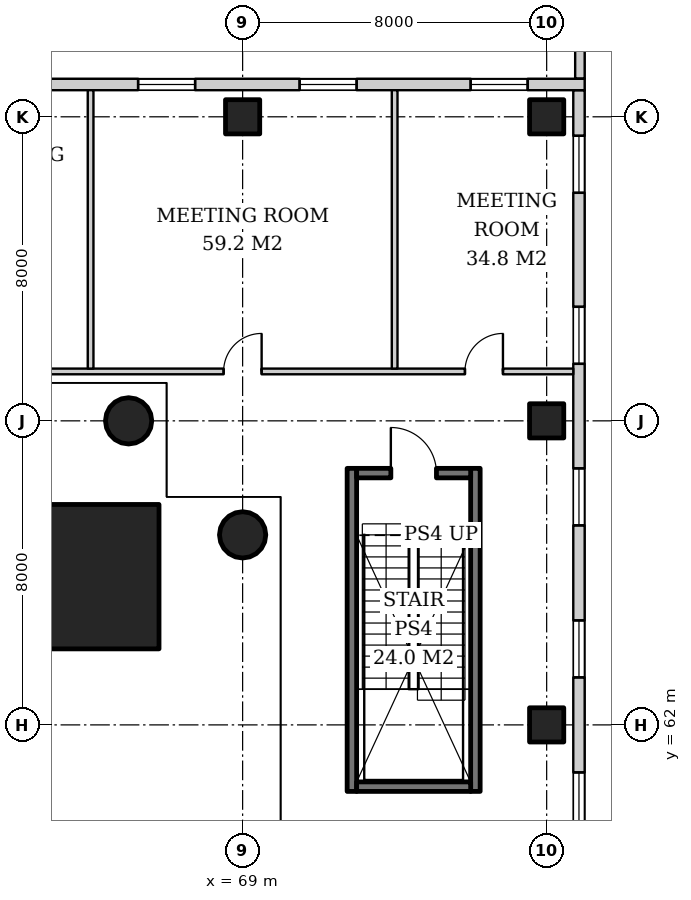
"""IFC4 building model, lengths in metres.
Left out: names, types, materials, properties, quantities, classifications, styles, units other than length and angle.
Written with IfcOpenShell. Run it as: python <this file> out.ifc"""

import sys

from ifc_helpers import new_model, si_unit, direction, frame, frame_2d, origin, origin_2d, place, context, subcontext, project, spatial, rectangle, hollow_circle, extrude, element, fill, save


model = new_model("IFC4")
c1 = context("Model", 3, precision=1e-05, world=origin(), true_north=direction((0.0, 1.0)))
c2 = subcontext(c1, "Body", "Model", "MODEL_VIEW")
j1 = project(units=[si_unit("LENGTHUNIT", "METRE"), si_unit("PLANEANGLEUNIT", "RADIAN")], contexts=[c1])
p1 = place(None, origin())
s1 = spatial("IfcSite", under=j1, at=p1, CompositionType="ELEMENT")
p2 = place(p1, origin())
s2 = spatial("IfcBuilding", under=s1, at=p2, CompositionType="ELEMENT")
p3 = place(p2, frame((0.0, 0.0, 11.0)))
s3 = spatial("IfcBuildingStorey", under=s2, at=p3, CompositionType="ELEMENT", Elevation=11.0)
for number, where, z_axis, x_axis in (
    (1, (69.0, 78.0, 0.0), (0.0, 0.0, 1.0), (1.0, 0.0, 0.0)),
    (2, (77.0, 62.0, 0.0), (0.0, 0.0, 1.0), (1.0, 0.0, 0.0)),
    (3, (77.0, 70.0, 0.0), (0.0, 0.0, 1.0), (1.0, 0.0, 0.0)),
    (4, (77.0, 78.0, 0.0), (0.0, 0.0, 1.0), (1.0, 0.0, 0.0)),
):
    element("IfcColumn", number, at=place(p3, frame(where, z_axis=z_axis, x_axis=x_axis)), inside=s3, PredefinedType="COLUMN", context=c2, shape_type="SweptSolid", body=[
        extrude(rectangle(XDim=0.9, YDim=0.9, at=origin_2d()), origin(), (0.0, 0.0, 1.0), 5.0),
    ])
p4 = place(p3, frame((64.9, 65.9, 0.0), z_axis=(0.0, 0.0, 1.0), x_axis=(1.0, 0.0, 0.0)))
e5 = element("IfcColumn", 5, at=p4, inside=s3, PredefinedType="COLUMN", context=c2, shape_type="SweptSolid", body=[
    extrude(rectangle(XDim=3.8, YDim=3.8, at=origin_2d()), origin(), (0.0, 0.0, 1.0), 5.0),
])
for number, where, z_axis, x_axis in (
    (6, (69.0, 67.0, 0.0), (0.0, 0.0, 1.0), (1.0, 0.0, 0.0)),
    (7, (66.0, 70.0, 0.0), (0.0, 0.0, 1.0), (1.0, 0.0, 0.0)),
):
    element("IfcColumn", number, at=place(p3, frame(where, z_axis=z_axis, x_axis=x_axis)), inside=s3, PredefinedType="COLUMN", context=c2, shape_type="SweptSolid", body=[
        extrude(hollow_circle(Radius=0.61, WallThickness=0.04, at=origin_2d()), origin(), (0.0, 0.0, 1.0), 5.0),
    ])
p5 = place(p3, frame((77.85, 21.3, 0.0), z_axis=(0.0, 0.0, 1.0), x_axis=(0.0, 1.0, 0.0)))
e8 = element("IfcWall", 8, at=p5, inside=s3, PredefinedType="SOLIDWALL", context=c2, shape_type="SweptSolid", body=[
    extrude(rectangle(XDim=57.4, YDim=0.3, at=frame_2d((28.7, 0.0))), origin(), (0.0, 0.0, 1.0), 4.7),
])
p6 = place(p5, frame((1.2, 0.0, 0.9)))
e9 = element("IfcOpeningElement", 9, at=p6, cuts=e8, PredefinedType="OPENING", context=c2, shape_type="SweptSolid", body=[
    extrude(rectangle(XDim=1.5, YDim=3.2, at=frame_2d((0.75, 1.6))), frame((0.0, 0.16, 0.0), z_axis=(0.0, -1.0, 0.0), x_axis=(1.0, 0.0, 0.0)), (0.0, 0.0, 1.0), 0.32),
])
p7 = place(p5, frame((5.7, 0.0, 0.9)))
e10 = element("IfcOpeningElement", 10, at=p7, cuts=e8, PredefinedType="OPENING", context=c2, shape_type="SweptSolid", body=[
    extrude(rectangle(XDim=1.5, YDim=3.2, at=frame_2d((0.75, 1.6))), frame((0.0, 0.16, 0.0), z_axis=(0.0, -1.0, 0.0), x_axis=(1.0, 0.0, 0.0)), (0.0, 0.0, 1.0), 0.32),
])
p8 = place(p5, frame((9.95, 0.0, 0.9)))
e11 = element("IfcOpeningElement", 11, at=p8, cuts=e8, PredefinedType="OPENING", context=c2, shape_type="SweptSolid", body=[
    extrude(rectangle(XDim=1.5, YDim=3.2, at=frame_2d((0.75, 1.6))), frame((0.0, 0.16, 0.0), z_axis=(0.0, -1.0, 0.0), x_axis=(1.0, 0.0, 0.0)), (0.0, 0.0, 1.0), 0.32),
])
p9 = place(p5, frame((13.95, 0.0, 0.9)))
e12 = element("IfcOpeningElement", 12, at=p9, cuts=e8, PredefinedType="OPENING", context=c2, shape_type="SweptSolid", body=[
    extrude(rectangle(XDim=1.5, YDim=3.2, at=frame_2d((0.75, 1.6))), frame((0.0, 0.16, 0.0), z_axis=(0.0, -1.0, 0.0), x_axis=(1.0, 0.0, 0.0)), (0.0, 0.0, 1.0), 0.32),
])
p10 = place(p5, frame((25.95, 0.0, 0.9)))
e13 = element("IfcOpeningElement", 13, at=p10, cuts=e8, PredefinedType="OPENING", context=c2, shape_type="SweptSolid", body=[
    extrude(rectangle(XDim=1.5, YDim=3.2, at=frame_2d((0.75, 1.6))), frame((0.0, 0.16, 0.0), z_axis=(0.0, -1.0, 0.0), x_axis=(1.0, 0.0, 0.0)), (0.0, 0.0, 1.0), 0.32),
])
p11 = place(p5, frame((29.95, 0.0, 0.9)))
e14 = element("IfcOpeningElement", 14, at=p11, cuts=e8, PredefinedType="OPENING", context=c2, shape_type="SweptSolid", body=[
    extrude(rectangle(XDim=1.5, YDim=3.2, at=frame_2d((0.75, 1.6))), frame((0.0, 0.16, 0.0), z_axis=(0.0, -1.0, 0.0), x_axis=(1.0, 0.0, 0.0)), (0.0, 0.0, 1.0), 0.32),
])
p12 = place(p5, frame((33.95, 0.0, 0.9)))
e15 = element("IfcOpeningElement", 15, at=p12, cuts=e8, PredefinedType="OPENING", context=c2, shape_type="SweptSolid", body=[
    extrude(rectangle(XDim=1.5, YDim=3.2, at=frame_2d((0.75, 1.6))), frame((0.0, 0.16, 0.0), z_axis=(0.0, -1.0, 0.0), x_axis=(1.0, 0.0, 0.0)), (0.0, 0.0, 1.0), 0.32),
])
p13 = place(p5, frame((37.95, 0.0, 0.9)))
e16 = element("IfcOpeningElement", 16, at=p13, cuts=e8, PredefinedType="OPENING", context=c2, shape_type="SweptSolid", body=[
    extrude(rectangle(XDim=1.5, YDim=3.2, at=frame_2d((0.75, 1.6))), frame((0.0, 0.16, 0.0), z_axis=(0.0, -1.0, 0.0), x_axis=(1.0, 0.0, 0.0)), (0.0, 0.0, 1.0), 0.32),
])
p14 = place(p5, frame((41.95, 0.0, 0.9)))
e17 = element("IfcOpeningElement", 17, at=p14, cuts=e8, PredefinedType="OPENING", context=c2, shape_type="SweptSolid", body=[
    extrude(rectangle(XDim=1.5, YDim=3.2, at=frame_2d((0.75, 1.6))), frame((0.0, 0.16, 0.0), z_axis=(0.0, -1.0, 0.0), x_axis=(1.0, 0.0, 0.0)), (0.0, 0.0, 1.0), 0.32),
])
p15 = place(p5, frame((45.95, 0.0, 0.9)))
e18 = element("IfcOpeningElement", 18, at=p15, cuts=e8, PredefinedType="OPENING", context=c2, shape_type="SweptSolid", body=[
    extrude(rectangle(XDim=1.5, YDim=3.2, at=frame_2d((0.75, 1.6))), frame((0.0, 0.16, 0.0), z_axis=(0.0, -1.0, 0.0), x_axis=(1.0, 0.0, 0.0)), (0.0, 0.0, 1.0), 0.32),
])
p16 = place(p5, frame((50.2, 0.0, 0.9)))
e19 = element("IfcOpeningElement", 19, at=p16, cuts=e8, PredefinedType="OPENING", context=c2, shape_type="SweptSolid", body=[
    extrude(rectangle(XDim=1.5, YDim=3.2, at=frame_2d((0.75, 1.6))), frame((0.0, 0.16, 0.0), z_axis=(0.0, -1.0, 0.0), x_axis=(1.0, 0.0, 0.0)), (0.0, 0.0, 1.0), 0.32),
])
p17 = place(p5, frame((54.7, 0.0, 0.9)))
e20 = element("IfcOpeningElement", 20, at=p17, cuts=e8, PredefinedType="OPENING", context=c2, shape_type="SweptSolid", body=[
    extrude(rectangle(XDim=1.5, YDim=3.2, at=frame_2d((0.75, 1.6))), frame((0.0, 0.16, 0.0), z_axis=(0.0, -1.0, 0.0), x_axis=(1.0, 0.0, 0.0)), (0.0, 0.0, 1.0), 0.32),
])
p18 = place(p5, frame((22.115, 0.0, 0.0)))
e21 = element("IfcOpeningElement", 21, at=p18, cuts=e8, PredefinedType="OPENING", context=c2, shape_type="SweptSolid", body=[
    extrude(rectangle(XDim=2.0, YDim=2.4, at=frame_2d((1.0, 1.2))), frame((0.0, 0.16, 0.0), z_axis=(0.0, -1.0, 0.0), x_axis=(1.0, 0.0, 0.0)), (0.0, 0.0, 1.0), 0.32),
])
p19 = place(p3, frame((78.0, 78.85, 0.0), z_axis=(0.0, 0.0, 1.0), x_axis=(-1.0, 0.0, 0.0)))
e22 = element("IfcWall", 22, at=p19, inside=s3, PredefinedType="SOLIDWALL", context=c2, shape_type="SweptSolid", body=[
    extrude(rectangle(XDim=58.0, YDim=0.3, at=frame_2d((29.0, 0.0))), origin(), (0.0, 0.0, 1.0), 4.7),
])
p20 = place(p19, frame((1.5, 0.0, 0.9)))
e23 = element("IfcOpeningElement", 23, at=p20, cuts=e22, PredefinedType="OPENING", context=c2, shape_type="SweptSolid", body=[
    extrude(rectangle(XDim=1.5, YDim=3.2, at=frame_2d((0.75, 1.6))), frame((0.0, 0.16, 0.0), z_axis=(0.0, -1.0, 0.0), x_axis=(1.0, 0.0, 0.0)), (0.0, 0.0, 1.0), 0.32),
])
p21 = place(p19, frame((6.0, 0.0, 0.9)))
e24 = element("IfcOpeningElement", 24, at=p21, cuts=e22, PredefinedType="OPENING", context=c2, shape_type="SweptSolid", body=[
    extrude(rectangle(XDim=1.5, YDim=3.2, at=frame_2d((0.75, 1.6))), frame((0.0, 0.16, 0.0), z_axis=(0.0, -1.0, 0.0), x_axis=(1.0, 0.0, 0.0)), (0.0, 0.0, 1.0), 0.32),
])
p22 = place(p19, frame((10.25, 0.0, 0.9)))
e25 = element("IfcOpeningElement", 25, at=p22, cuts=e22, PredefinedType="OPENING", context=c2, shape_type="SweptSolid", body=[
    extrude(rectangle(XDim=1.5, YDim=3.2, at=frame_2d((0.75, 1.6))), frame((0.0, 0.16, 0.0), z_axis=(0.0, -1.0, 0.0), x_axis=(1.0, 0.0, 0.0)), (0.0, 0.0, 1.0), 0.32),
])
p23 = place(p19, frame((14.25, 0.0, 0.9)))
e26 = element("IfcOpeningElement", 26, at=p23, cuts=e22, PredefinedType="OPENING", context=c2, shape_type="SweptSolid", body=[
    extrude(rectangle(XDim=1.5, YDim=3.2, at=frame_2d((0.75, 1.6))), frame((0.0, 0.16, 0.0), z_axis=(0.0, -1.0, 0.0), x_axis=(1.0, 0.0, 0.0)), (0.0, 0.0, 1.0), 0.32),
])
p24 = place(p19, frame((18.25, 0.0, 0.9)))
e27 = element("IfcOpeningElement", 27, at=p24, cuts=e22, PredefinedType="OPENING", context=c2, shape_type="SweptSolid", body=[
    extrude(rectangle(XDim=1.5, YDim=3.2, at=frame_2d((0.75, 1.6))), frame((0.0, 0.16, 0.0), z_axis=(0.0, -1.0, 0.0), x_axis=(1.0, 0.0, 0.0)), (0.0, 0.0, 1.0), 0.32),
])
p25 = place(p19, frame((22.25, 0.0, 0.9)))
e28 = element("IfcOpeningElement", 28, at=p25, cuts=e22, PredefinedType="OPENING", context=c2, shape_type="SweptSolid", body=[
    extrude(rectangle(XDim=1.5, YDim=3.2, at=frame_2d((0.75, 1.6))), frame((0.0, 0.16, 0.0), z_axis=(0.0, -1.0, 0.0), x_axis=(1.0, 0.0, 0.0)), (0.0, 0.0, 1.0), 0.32),
])
p26 = place(p19, frame((26.1, 0.0, 0.0)))
e29 = element("IfcOpeningElement", 29, at=p26, cuts=e22, PredefinedType="OPENING", context=c2, shape_type="SweptSolid", body=[
    extrude(rectangle(XDim=1.8, YDim=2.4, at=frame_2d((0.9, 1.2))), frame((0.0, 0.16, 0.0), z_axis=(0.0, -1.0, 0.0), x_axis=(1.0, 0.0, 0.0)), (0.0, 0.0, 1.0), 0.32),
])
p27 = place(p19, frame((30.25, 0.0, 0.9)))
e30 = element("IfcOpeningElement", 30, at=p27, cuts=e22, PredefinedType="OPENING", context=c2, shape_type="SweptSolid", body=[
    extrude(rectangle(XDim=1.5, YDim=3.2, at=frame_2d((0.75, 1.6))), frame((0.0, 0.16, 0.0), z_axis=(0.0, -1.0, 0.0), x_axis=(1.0, 0.0, 0.0)), (0.0, 0.0, 1.0), 0.32),
])
p28 = place(p19, frame((34.25, 0.0, 0.9)))
e31 = element("IfcOpeningElement", 31, at=p28, cuts=e22, PredefinedType="OPENING", context=c2, shape_type="SweptSolid", body=[
    extrude(rectangle(XDim=1.5, YDim=3.2, at=frame_2d((0.75, 1.6))), frame((0.0, 0.16, 0.0), z_axis=(0.0, -1.0, 0.0), x_axis=(1.0, 0.0, 0.0)), (0.0, 0.0, 1.0), 0.32),
])
p29 = place(p19, frame((38.25, 0.0, 0.9)))
e32 = element("IfcOpeningElement", 32, at=p29, cuts=e22, PredefinedType="OPENING", context=c2, shape_type="SweptSolid", body=[
    extrude(rectangle(XDim=1.5, YDim=3.2, at=frame_2d((0.75, 1.6))), frame((0.0, 0.16, 0.0), z_axis=(0.0, -1.0, 0.0), x_axis=(1.0, 0.0, 0.0)), (0.0, 0.0, 1.0), 0.32),
])
p30 = place(p19, frame((42.25, 0.0, 0.9)))
e33 = element("IfcOpeningElement", 33, at=p30, cuts=e22, PredefinedType="OPENING", context=c2, shape_type="SweptSolid", body=[
    extrude(rectangle(XDim=1.5, YDim=3.2, at=frame_2d((0.75, 1.6))), frame((0.0, 0.16, 0.0), z_axis=(0.0, -1.0, 0.0), x_axis=(1.0, 0.0, 0.0)), (0.0, 0.0, 1.0), 0.32),
])
p31 = place(p19, frame((46.25, 0.0, 0.9)))
e34 = element("IfcOpeningElement", 34, at=p31, cuts=e22, PredefinedType="OPENING", context=c2, shape_type="SweptSolid", body=[
    extrude(rectangle(XDim=1.5, YDim=3.2, at=frame_2d((0.75, 1.6))), frame((0.0, 0.16, 0.0), z_axis=(0.0, -1.0, 0.0), x_axis=(1.0, 0.0, 0.0)), (0.0, 0.0, 1.0), 0.32),
])
p32 = place(p19, frame((50.5, 0.0, 0.9)))
e35 = element("IfcOpeningElement", 35, at=p32, cuts=e22, PredefinedType="OPENING", context=c2, shape_type="SweptSolid", body=[
    extrude(rectangle(XDim=1.5, YDim=3.2, at=frame_2d((0.75, 1.6))), frame((0.0, 0.16, 0.0), z_axis=(0.0, -1.0, 0.0), x_axis=(1.0, 0.0, 0.0)), (0.0, 0.0, 1.0), 0.32),
])
p33 = place(p19, frame((55.0, 0.0, 0.9)))
e36 = element("IfcOpeningElement", 36, at=p33, cuts=e22, PredefinedType="OPENING", context=c2, shape_type="SweptSolid", body=[
    extrude(rectangle(XDim=1.5, YDim=3.2, at=frame_2d((0.75, 1.6))), frame((0.0, 0.16, 0.0), z_axis=(0.0, -1.0, 0.0), x_axis=(1.0, 0.0, 0.0)), (0.0, 0.0, 1.0), 0.32),
])
p34 = place(p3, frame((77.875, 79.01, 0.0), z_axis=(0.0, 0.0, 1.0), x_axis=(0.0, 1.0, 0.0)))
e37 = element("IfcWall", 37, at=p34, inside=s3, PredefinedType="PARAPET", context=c2, shape_type="SweptSolid", body=[
    extrude(rectangle(XDim=7.74, YDim=0.25, at=frame_2d((3.87, 0.0))), origin(), (0.0, 0.0, 1.0), 1.1),
])
for number, where, z_axis, x_axis in (
    (38, (71.875, 60.25, 0.0), (0.0, 0.0, 1.0), (0.0, 1.0, 0.0)),
    (39, (75.125, 60.25, 0.0), (0.0, 0.0, 1.0), (0.0, 1.0, 0.0)),
):
    element("IfcWall", number, at=place(p3, frame(where, z_axis=z_axis, x_axis=x_axis)), inside=s3, PredefinedType="SOLIDWALL", context=c2, shape_type="SweptSolid", body=[
        extrude(rectangle(XDim=8.5, YDim=0.25, at=frame_2d((4.25, 0.0))), origin(), (0.0, 0.0, 1.0), 4.7),
    ])
p35 = place(p3, frame((72.0, 60.375, 0.0), z_axis=(0.0, 0.0, 1.0), x_axis=(1.0, 0.0, 0.0)))
e40 = element("IfcWall", 40, at=p35, inside=s3, PredefinedType="SOLIDWALL", context=c2, shape_type="SweptSolid", body=[
    extrude(rectangle(XDim=3.0, YDim=0.25, at=frame_2d((1.5, 0.0))), origin(), (0.0, 0.0, 1.0), 4.7),
])
p36 = place(p3, frame((72.0, 68.625, 0.0), z_axis=(0.0, 0.0, 1.0), x_axis=(1.0, 0.0, 0.0)))
e41 = element("IfcWall", 41, at=p36, inside=s3, PredefinedType="SOLIDWALL", context=c2, shape_type="SweptSolid", body=[
    extrude(rectangle(XDim=3.0, YDim=0.25, at=frame_2d((1.5, 0.0))), origin(), (0.0, 0.0, 1.0), 4.7),
])
p37 = place(p36, frame((0.9, 0.0, 0.0)))
e42 = element("IfcOpeningElement", 42, at=p37, cuts=e41, PredefinedType="OPENING", context=c2, shape_type="SweptSolid", body=[
    extrude(rectangle(XDim=1.2, YDim=2.1, at=frame_2d((0.6, 1.05))), frame((0.0, 0.135, 0.0), z_axis=(0.0, -1.0, 0.0), x_axis=(1.0, 0.0, 0.0)), (0.0, 0.0, 1.0), 0.27),
])
p38 = place(p3, frame((20.3, 71.3, 0.0), z_axis=(0.0, 0.0, 1.0), x_axis=(1.0, 0.0, 0.0)))
e43 = element("IfcWall", 43, at=p38, inside=s3, PredefinedType="PARTITIONING", context=c2, shape_type="SweptSolid", body=[
    extrude(rectangle(XDim=57.4, YDim=0.15, at=frame_2d((28.7, 0.0))), origin(), (0.0, 0.0, 1.0), 3.2),
])
p39 = place(p38, frame((1.85, 0.0, 0.0)))
e44 = element("IfcOpeningElement", 44, at=p39, cuts=e43, PredefinedType="OPENING", context=c2, shape_type="SweptSolid", body=[
    extrude(rectangle(XDim=1.0, YDim=2.1, at=frame_2d((0.5, 1.05))), frame((0.0, 0.085, 0.0), z_axis=(0.0, -1.0, 0.0), x_axis=(1.0, 0.0, 0.0)), (0.0, 0.0, 1.0), 0.17),
])
p40 = place(p38, frame((6.2, 0.0, 0.0)))
e45 = element("IfcOpeningElement", 45, at=p40, cuts=e43, PredefinedType="OPENING", context=c2, shape_type="SweptSolid", body=[
    extrude(rectangle(XDim=1.0, YDim=2.1, at=frame_2d((0.5, 1.05))), frame((0.0, 0.085, 0.0), z_axis=(0.0, -1.0, 0.0), x_axis=(1.0, 0.0, 0.0)), (0.0, 0.0, 1.0), 0.17),
])
p41 = place(p38, frame((10.2, 0.0, 0.0)))
e46 = element("IfcOpeningElement", 46, at=p41, cuts=e43, PredefinedType="OPENING", context=c2, shape_type="SweptSolid", body=[
    extrude(rectangle(XDim=1.0, YDim=2.1, at=frame_2d((0.5, 1.05))), frame((0.0, 0.085, 0.0), z_axis=(0.0, -1.0, 0.0), x_axis=(1.0, 0.0, 0.0)), (0.0, 0.0, 1.0), 0.17),
])
p42 = place(p38, frame((16.2, 0.0, 0.0)))
e47 = element("IfcOpeningElement", 47, at=p42, cuts=e43, PredefinedType="OPENING", context=c2, shape_type="SweptSolid", body=[
    extrude(rectangle(XDim=1.0, YDim=2.1, at=frame_2d((0.5, 1.05))), frame((0.0, 0.085, 0.0), z_axis=(0.0, -1.0, 0.0), x_axis=(1.0, 0.0, 0.0)), (0.0, 0.0, 1.0), 0.17),
])
p43 = place(p38, frame((22.2, 0.0, 0.0)))
e48 = element("IfcOpeningElement", 48, at=p43, cuts=e43, PredefinedType="OPENING", context=c2, shape_type="SweptSolid", body=[
    extrude(rectangle(XDim=1.0, YDim=2.1, at=frame_2d((0.5, 1.05))), frame((0.0, 0.085, 0.0), z_axis=(0.0, -1.0, 0.0), x_axis=(1.0, 0.0, 0.0)), (0.0, 0.0, 1.0), 0.17),
])
p44 = place(p38, frame((26.2, 0.0, 0.0)))
e49 = element("IfcOpeningElement", 49, at=p44, cuts=e43, PredefinedType="OPENING", context=c2, shape_type="SweptSolid", body=[
    extrude(rectangle(XDim=1.0, YDim=2.1, at=frame_2d((0.5, 1.05))), frame((0.0, 0.085, 0.0), z_axis=(0.0, -1.0, 0.0), x_axis=(1.0, 0.0, 0.0)), (0.0, 0.0, 1.0), 0.17),
])
p45 = place(p38, frame((32.2, 0.0, 0.0)))
e50 = element("IfcOpeningElement", 50, at=p45, cuts=e43, PredefinedType="OPENING", context=c2, shape_type="SweptSolid", body=[
    extrude(rectangle(XDim=1.0, YDim=2.1, at=frame_2d((0.5, 1.05))), frame((0.0, 0.085, 0.0), z_axis=(0.0, -1.0, 0.0), x_axis=(1.0, 0.0, 0.0)), (0.0, 0.0, 1.0), 0.17),
])
p46 = place(p38, frame((38.2, 0.0, 0.0)))
e51 = element("IfcOpeningElement", 51, at=p46, cuts=e43, PredefinedType="OPENING", context=c2, shape_type="SweptSolid", body=[
    extrude(rectangle(XDim=1.0, YDim=2.1, at=frame_2d((0.5, 1.05))), frame((0.0, 0.085, 0.0), z_axis=(0.0, -1.0, 0.0), x_axis=(1.0, 0.0, 0.0)), (0.0, 0.0, 1.0), 0.17),
])
p47 = place(p38, frame((42.2, 0.0, 0.0)))
e52 = element("IfcOpeningElement", 52, at=p47, cuts=e43, PredefinedType="OPENING", context=c2, shape_type="SweptSolid", body=[
    extrude(rectangle(XDim=1.0, YDim=2.1, at=frame_2d((0.5, 1.05))), frame((0.0, 0.085, 0.0), z_axis=(0.0, -1.0, 0.0), x_axis=(1.0, 0.0, 0.0)), (0.0, 0.0, 1.0), 0.17),
])
p48 = place(p38, frame((48.2, 0.0, 0.0)))
e53 = element("IfcOpeningElement", 53, at=p48, cuts=e43, PredefinedType="OPENING", context=c2, shape_type="SweptSolid", body=[
    extrude(rectangle(XDim=1.0, YDim=2.1, at=frame_2d((0.5, 1.05))), frame((0.0, 0.085, 0.0), z_axis=(0.0, -1.0, 0.0), x_axis=(1.0, 0.0, 0.0)), (0.0, 0.0, 1.0), 0.17),
])
p49 = place(p38, frame((54.55, 0.0, 0.0)))
e54 = element("IfcOpeningElement", 54, at=p49, cuts=e43, PredefinedType="OPENING", context=c2, shape_type="SweptSolid", body=[
    extrude(rectangle(XDim=1.0, YDim=2.1, at=frame_2d((0.5, 1.05))), frame((0.0, 0.085, 0.0), z_axis=(0.0, -1.0, 0.0), x_axis=(1.0, 0.0, 0.0)), (0.0, 0.0, 1.0), 0.17),
])
for number, where, z_axis, x_axis in (
    (55, (65.0, 71.375, 0.0), (0.0, 0.0, 1.0), (0.0, 1.0, 0.0)),
    (56, (73.0, 71.375, 0.0), (0.0, 0.0, 1.0), (0.0, 1.0, 0.0)),
):
    element("IfcWall", number, at=place(p3, frame(where, z_axis=z_axis, x_axis=x_axis)), inside=s3, PredefinedType="PARTITIONING", context=c2, shape_type="SweptSolid", body=[
        extrude(rectangle(XDim=7.325, YDim=0.15, at=frame_2d((3.663, 0.0))), origin(), (0.0, 0.0, 1.0), 3.2),
    ])
p50 = place(p13, origin())
e57 = element("IfcWindow", 57, at=p50, inside=s3, PartitioningType="SINGLE_PANEL", PredefinedType="WINDOW", context=c2, shape_type="SweptSolid", body=[
    extrude(rectangle(XDim=1.5, YDim=3.2, at=frame_2d((0.75, 1.6))), frame((0.0, 0.03, 0.0), z_axis=(0.0, -1.0, 0.0), x_axis=(1.0, 0.0, 0.0)), (0.0, 0.0, 1.0), 0.06),
])
fill(e16, e57)
p51 = place(p14, origin())
e58 = element("IfcWindow", 58, at=p51, inside=s3, PartitioningType="SINGLE_PANEL", PredefinedType="WINDOW", context=c2, shape_type="SweptSolid", body=[
    extrude(rectangle(XDim=1.5, YDim=3.2, at=frame_2d((0.75, 1.6))), frame((0.0, 0.03, 0.0), z_axis=(0.0, -1.0, 0.0), x_axis=(1.0, 0.0, 0.0)), (0.0, 0.0, 1.0), 0.06),
])
fill(e17, e58)
p52 = place(p15, origin())
e59 = element("IfcWindow", 59, at=p52, inside=s3, PartitioningType="SINGLE_PANEL", PredefinedType="WINDOW", context=c2, shape_type="SweptSolid", body=[
    extrude(rectangle(XDim=1.5, YDim=3.2, at=frame_2d((0.75, 1.6))), frame((0.0, 0.03, 0.0), z_axis=(0.0, -1.0, 0.0), x_axis=(1.0, 0.0, 0.0)), (0.0, 0.0, 1.0), 0.06),
])
fill(e18, e59)
p53 = place(p16, origin())
e60 = element("IfcWindow", 60, at=p53, inside=s3, PartitioningType="SINGLE_PANEL", PredefinedType="WINDOW", context=c2, shape_type="SweptSolid", body=[
    extrude(rectangle(XDim=1.5, YDim=3.2, at=frame_2d((0.75, 1.6))), frame((0.0, 0.03, 0.0), z_axis=(0.0, -1.0, 0.0), x_axis=(1.0, 0.0, 0.0)), (0.0, 0.0, 1.0), 0.06),
])
fill(e19, e60)
p54 = place(p17, origin())
e61 = element("IfcWindow", 61, at=p54, inside=s3, PartitioningType="SINGLE_PANEL", PredefinedType="WINDOW", context=c2, shape_type="SweptSolid", body=[
    extrude(rectangle(XDim=1.5, YDim=3.2, at=frame_2d((0.75, 1.6))), frame((0.0, 0.03, 0.0), z_axis=(0.0, -1.0, 0.0), x_axis=(1.0, 0.0, 0.0)), (0.0, 0.0, 1.0), 0.06),
])
fill(e20, e61)
p55 = place(p20, origin())
e62 = element("IfcWindow", 62, at=p55, inside=s3, PartitioningType="SINGLE_PANEL", PredefinedType="WINDOW", context=c2, shape_type="SweptSolid", body=[
    extrude(rectangle(XDim=1.5, YDim=3.2, at=frame_2d((0.75, 1.6))), frame((0.0, 0.03, 0.0), z_axis=(0.0, -1.0, 0.0), x_axis=(1.0, 0.0, 0.0)), (0.0, 0.0, 1.0), 0.06),
])
fill(e23, e62)
p56 = place(p21, origin())
e63 = element("IfcWindow", 63, at=p56, inside=s3, PartitioningType="SINGLE_PANEL", PredefinedType="WINDOW", context=c2, shape_type="SweptSolid", body=[
    extrude(rectangle(XDim=1.5, YDim=3.2, at=frame_2d((0.75, 1.6))), frame((0.0, 0.03, 0.0), z_axis=(0.0, -1.0, 0.0), x_axis=(1.0, 0.0, 0.0)), (0.0, 0.0, 1.0), 0.06),
])
fill(e24, e63)
p57 = place(p22, origin())
e64 = element("IfcWindow", 64, at=p57, inside=s3, PartitioningType="SINGLE_PANEL", PredefinedType="WINDOW", context=c2, shape_type="SweptSolid", body=[
    extrude(rectangle(XDim=1.5, YDim=3.2, at=frame_2d((0.75, 1.6))), frame((0.0, 0.03, 0.0), z_axis=(0.0, -1.0, 0.0), x_axis=(1.0, 0.0, 0.0)), (0.0, 0.0, 1.0), 0.06),
])
fill(e25, e64)
p58 = place(p37, origin())
e65 = element("IfcDoor", 65, at=p58, inside=s3, OperationType="SINGLE_SWING_LEFT", PredefinedType="DOOR", context=c2, shape_type="SweptSolid", body=[
    extrude(rectangle(XDim=1.2, YDim=2.1, at=frame_2d((0.6, 1.05))), frame((0.0, 0.025, 0.0), z_axis=(0.0, -1.0, 0.0), x_axis=(1.0, 0.0, 0.0)), (0.0, 0.0, 1.0), 0.05),
])
fill(e42, e65)
p59 = place(p48, origin())
e66 = element("IfcDoor", 66, at=p59, inside=s3, OperationType="SINGLE_SWING_RIGHT", PredefinedType="DOOR", context=c2, shape_type="SweptSolid", body=[
    extrude(rectangle(XDim=1.0, YDim=2.1, at=frame_2d((0.5, 1.05))), frame((0.0, 0.025, 0.0), z_axis=(0.0, -1.0, 0.0), x_axis=(1.0, 0.0, 0.0)), (0.0, 0.0, 1.0), 0.05),
])
fill(e53, e66)
p60 = place(p49, origin())
e67 = element("IfcDoor", 67, at=p60, inside=s3, OperationType="SINGLE_SWING_RIGHT", PredefinedType="DOOR", context=c2, shape_type="SweptSolid", body=[
    extrude(rectangle(XDim=1.0, YDim=2.1, at=frame_2d((0.5, 1.05))), frame((0.0, 0.025, 0.0), z_axis=(0.0, -1.0, 0.0), x_axis=(1.0, 0.0, 0.0)), (0.0, 0.0, 1.0), 0.05),
])
fill(e54, e67)
save(model, sys.argv[1])
